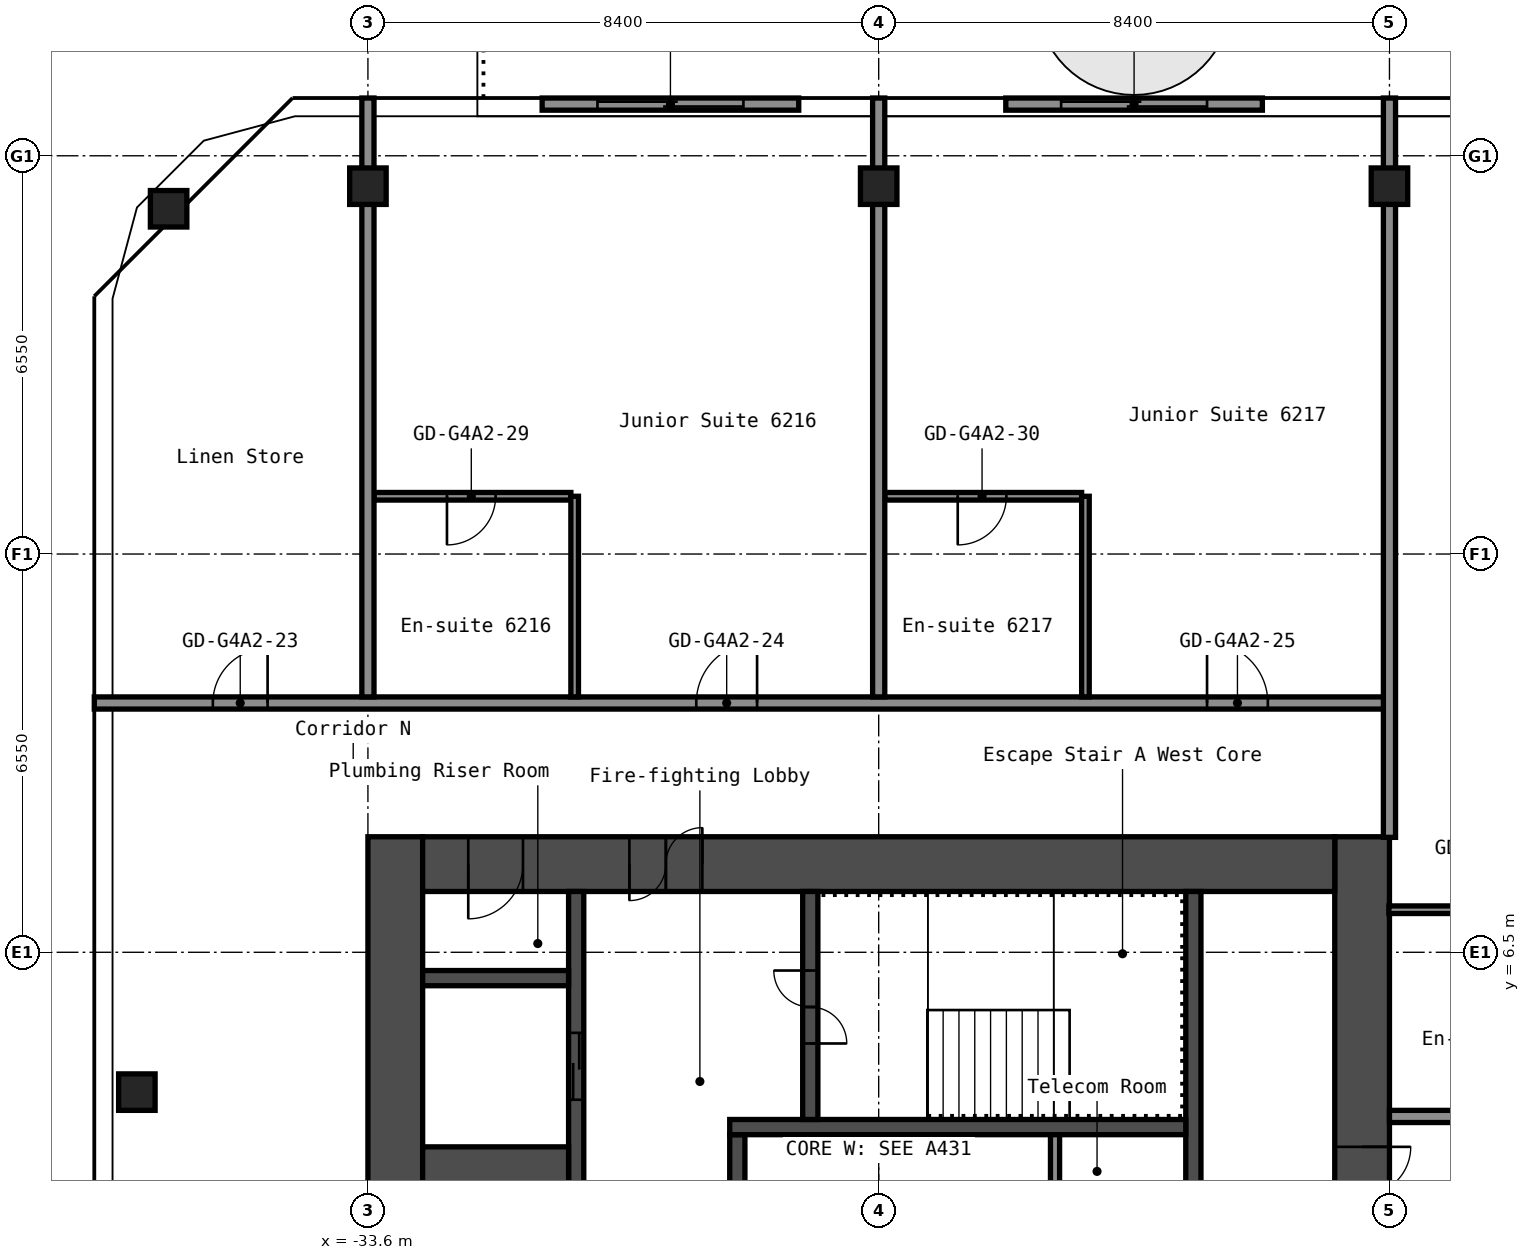
"""IFC4 building model, lengths in metres.
Left out: names, types, materials, properties, quantities, classifications, styles, units other than length and angle.
Written with IfcOpenShell. Run it as: python <this file> out.ifc"""

import sys

from ifc_helpers import new_model, si_unit, direction, frame, frame_2d, origin, origin_2d, place, context, subcontext, project, spatial, rectangle, hollow_rectangle, extrude, element, fill, save


model = new_model("IFC4")
c1 = context("Model", 3, precision=1e-05, world=origin(), true_north=direction((0.0, 1.0)))
c2 = subcontext(c1, "Body", "Model", "MODEL_VIEW")
j1 = project(units=[si_unit("LENGTHUNIT", "METRE"), si_unit("PLANEANGLEUNIT", "RADIAN")], contexts=[c1])
p1 = place(None, origin())
s1 = spatial("IfcSite", under=j1, at=p1, CompositionType="ELEMENT")
p2 = place(p1, origin())
s2 = spatial("IfcBuilding", under=s1, at=p2, CompositionType="ELEMENT")
p3 = place(p2, frame((0.0, 0.0, 218.6)))
s3 = spatial("IfcBuildingStorey", under=s2, at=p3, CompositionType="ELEMENT", Elevation=218.6)
for number, where, z_axis, x_axis in (
    (1, (-37.4, 4.2, 0.0), (0.0, 0.0, 1.0), (1.0, 0.0, 0.0)),
    (2, (-36.878, 18.729, 0.0), (0.0, 0.0, 1.0), (1.0, 0.0, 0.0)),
    (3, (-33.6, 19.1, 0.0), (0.0, 0.0, 1.0), (1.0, 0.0, 0.0)),
    (4, (-25.2, 19.1, 0.0), (0.0, 0.0, 1.0), (1.0, 0.0, 0.0)),
    (5, (-16.8, 19.1, 0.0), (0.0, 0.0, 1.0), (1.0, 0.0, 0.0)),
):
    element("IfcColumn", number, at=place(p3, frame(where, z_axis=z_axis, x_axis=x_axis)), inside=s3, PredefinedType="COLUMN", context=c2, shape_type="SweptSolid", body=[
        extrude(hollow_rectangle(XDim=0.6, YDim=0.6, WallThickness=0.025, InnerFilletRadius=0.038, OuterFilletRadius=0.062, at=origin_2d()), origin(), (0.0, 0.0, 1.0), 2.75),
    ])
p4 = place(p3, frame((-17.25, -8.4, 0.0), z_axis=(0.0, 0.0, 1.0), x_axis=(0.0, 1.0, 0.0)))
e6 = element("IfcWall", 6, at=p4, inside=s3, PredefinedType="SHEAR", context=c2, shape_type="SweptSolid", body=[
    extrude(rectangle(XDim=16.8, YDim=0.9, at=frame_2d((8.4, 0.0))), origin(), (0.0, 0.0, 1.0), 2.75),
])
p5 = place(p4, frame((10.1, 0.0, 0.0)))
e7 = element("IfcOpeningElement", 7, at=p5, cuts=e6, PredefinedType="OPENING", context=c2, shape_type="SweptSolid", body=[
    extrude(rectangle(XDim=1.6, YDim=2.1, at=frame_2d((0.8, 1.05))), frame((0.0, 0.46, 0.0), z_axis=(0.0, -1.0, 0.0), x_axis=(1.0, 0.0, 0.0)), (0.0, 0.0, 1.0), 0.92),
])
p6 = place(p3, frame((-33.15, -8.4, 0.0), z_axis=(0.0, 0.0, 1.0), x_axis=(0.0, 1.0, 0.0)))
e8 = element("IfcWall", 8, at=p6, inside=s3, PredefinedType="SHEAR", context=c2, shape_type="SweptSolid", body=[
    extrude(rectangle(XDim=16.8, YDim=0.9, at=frame_2d((8.4, 0.0))), origin(), (0.0, 0.0, 1.0), 2.75),
])
p7 = place(p3, frame((-32.7, 7.95, 0.0), z_axis=(0.0, 0.0, 1.0), x_axis=(1.0, 0.0, 0.0)))
e9 = element("IfcWall", 9, at=p7, inside=s3, PredefinedType="SHEAR", context=c2, shape_type="SweptSolid", body=[
    extrude(rectangle(XDim=15.0, YDim=0.9, at=frame_2d((7.5, 0.0))), origin(), (0.0, 0.0, 1.0), 2.75),
])
p8 = place(p7, frame((3.4, 0.0, 0.0)))
e10 = element("IfcOpeningElement", 10, at=p8, cuts=e9, PredefinedType="OPENING", context=c2, shape_type="SweptSolid", body=[
    extrude(rectangle(XDim=1.2, YDim=2.1, at=frame_2d((0.6, 1.05))), frame((0.0, 0.46, 0.0), z_axis=(0.0, -1.0, 0.0), x_axis=(1.0, 0.0, 0.0)), (0.0, 0.0, 1.0), 0.92),
])
p9 = place(p7, frame((0.75, 0.0, 0.0)))
e11 = element("IfcOpeningElement", 11, at=p9, cuts=e9, PredefinedType="OPENING", context=c2, shape_type="SweptSolid", body=[
    extrude(rectangle(XDim=0.9, YDim=2.1, at=frame_2d((0.45, 1.05))), frame((0.0, 0.46, 0.0), z_axis=(0.0, -1.0, 0.0), x_axis=(1.0, 0.0, 0.0)), (0.0, 0.0, 1.0), 0.92),
])
p10 = place(p3, frame((-20.025, 1.2, 0.0), z_axis=(0.0, 0.0, 1.0), x_axis=(0.0, 1.0, 0.0)))
e12 = element("IfcWall", 12, at=p10, inside=s3, PredefinedType="SHEAR", context=c2, shape_type="SweptSolid", body=[
    extrude(rectangle(XDim=6.3, YDim=0.25, at=frame_2d((3.15, 0.0))), origin(), (0.0, 0.0, 1.0), 2.75),
])
p11 = place(p3, frame((-27.525, 1.45, 0.0), z_axis=(0.0, 0.0, 1.0), x_axis=(0.0, 1.0, 0.0)))
e13 = element("IfcWall", 13, at=p11, inside=s3, PredefinedType="SHEAR", context=c2, shape_type="SweptSolid", body=[
    extrude(rectangle(XDim=2.05, YDim=0.25, at=frame_2d((1.025, 0.0))), origin(), (0.0, 0.0, 1.0), 2.75),
])
p12 = place(p3, frame((-27.65, 3.625, 0.0), z_axis=(0.0, 0.0, 1.0), x_axis=(1.0, 0.0, 0.0)))
e14 = element("IfcWall", 14, at=p12, inside=s3, PredefinedType="SHEAR", context=c2, shape_type="SweptSolid", body=[
    extrude(rectangle(XDim=7.5, YDim=0.25, at=frame_2d((3.75, 0.0))), origin(), (0.0, 0.0, 1.0), 2.75),
])
p13 = place(p3, frame((-26.325, 3.75, 0.0), z_axis=(0.0, 0.0, 1.0), x_axis=(0.0, 1.0, 0.0)))
e15 = element("IfcWall", 15, at=p13, inside=s3, PredefinedType="SHEAR", context=c2, shape_type="SweptSolid", body=[
    extrude(rectangle(XDim=3.75, YDim=0.25, at=frame_2d((1.875, 0.0))), origin(), (0.0, 0.0, 1.0), 2.75),
])
p14 = place(p13, frame((1.25, 0.0, 0.0)))
e16 = element("IfcOpeningElement", 16, at=p14, cuts=e15, PredefinedType="OPENING", context=c2, shape_type="SweptSolid", body=[
    extrude(rectangle(XDim=1.2, YDim=2.1, at=frame_2d((0.6, 1.05))), frame((0.0, 0.135, 0.0), z_axis=(0.0, -1.0, 0.0), x_axis=(1.0, 0.0, 0.0)), (0.0, 0.0, 1.0), 0.27),
])
p15 = place(p3, frame((-30.175, 1.45, 0.0), z_axis=(0.0, 0.0, 1.0), x_axis=(0.0, 1.0, 0.0)))
e17 = element("IfcWall", 17, at=p15, inside=s3, PredefinedType="SHEAR", context=c2, shape_type="SweptSolid", body=[
    extrude(rectangle(XDim=6.05, YDim=0.25, at=frame_2d((3.025, 0.0))), origin(), (0.0, 0.0, 1.0), 2.75),
])
p16 = place(p15, frame((2.625, 0.0, 0.0)))
e18 = element("IfcOpeningElement", 18, at=p16, cuts=e17, PredefinedType="OPENING", context=c2, shape_type="SweptSolid", body=[
    extrude(rectangle(XDim=1.1, YDim=2.1, at=frame_2d((0.55, 1.05))), frame((0.0, 0.135, 0.0), z_axis=(0.0, -1.0, 0.0), x_axis=(1.0, 0.0, 0.0)), (0.0, 0.0, 1.0), 0.27),
])
p17 = place(p3, frame((-32.7, 2.375, 0.0), z_axis=(0.0, 0.0, 1.0), x_axis=(1.0, 0.0, 0.0)))
e19 = element("IfcWall", 19, at=p17, inside=s3, PredefinedType="SHEAR", context=c2, shape_type="SweptSolid", body=[
    extrude(rectangle(XDim=2.4, YDim=1.85, at=frame_2d((1.2, 0.0))), origin(), (0.0, 0.0, 1.0), 2.75),
])
p18 = place(p3, frame((-32.7, 6.075, 0.0), z_axis=(0.0, 0.0, 1.0), x_axis=(1.0, 0.0, 0.0)))
e20 = element("IfcWall", 20, at=p18, inside=s3, PredefinedType="SHEAR", context=c2, shape_type="SweptSolid", body=[
    extrude(rectangle(XDim=2.4, YDim=0.25, at=frame_2d((1.2, 0.0))), origin(), (0.0, 0.0, 1.0), 2.75),
])
p19 = place(p3, frame((-22.3, 1.45, 0.0), z_axis=(0.0, 0.0, 1.0), x_axis=(0.0, 1.0, 0.0)))
e21 = element("IfcWall", 21, at=p19, inside=s3, PredefinedType="PARTITIONING", context=c2, shape_type="SweptSolid", body=[
    extrude(rectangle(XDim=2.05, YDim=0.15, at=frame_2d((1.025, 0.0))), origin(), (0.0, 0.0, 1.0), 2.75),
])
p20 = place(p3, frame((-16.8, 3.8, 0.0), z_axis=(0.0, 0.0, 1.0), x_axis=(1.0, 0.0, 0.0)))
e22 = element("IfcWall", 22, at=p20, inside=s3, PredefinedType="PARTITIONING", context=c2, shape_type="SweptSolid", body=[
    extrude(rectangle(XDim=33.6, YDim=0.2, at=frame_2d((16.8, 0.0))), origin(), (0.0, 0.0, 1.0), 2.75),
])
p21 = place(p20, frame((5.4, 0.0, 0.0)))
e23 = element("IfcOpeningElement", 23, at=p21, cuts=e22, PredefinedType="OPENING", context=c2, shape_type="SweptSolid", body=[
    extrude(rectangle(XDim=1.0, YDim=2.1, at=frame_2d((0.5, 1.05))), frame((0.0, 0.11, 0.0), z_axis=(0.0, -1.0, 0.0), x_axis=(1.0, 0.0, 0.0)), (0.0, 0.0, 1.0), 0.22),
])
p22 = place(p20, frame((12.1, 0.0, 0.0)))
e24 = element("IfcOpeningElement", 24, at=p22, cuts=e22, PredefinedType="OPENING", context=c2, shape_type="SweptSolid", body=[
    extrude(rectangle(XDim=1.0, YDim=2.1, at=frame_2d((0.5, 1.05))), frame((0.0, 0.11, 0.0), z_axis=(0.0, -1.0, 0.0), x_axis=(1.0, 0.0, 0.0)), (0.0, 0.0, 1.0), 0.22),
])
p23 = place(p20, frame((18.87, 0.0, 0.0)))
e25 = element("IfcOpeningElement", 25, at=p23, cuts=e22, PredefinedType="OPENING", context=c2, shape_type="SweptSolid", body=[
    extrude(rectangle(XDim=0.9, YDim=2.1, at=frame_2d((0.45, 1.05))), frame((0.0, 0.11, 0.0), z_axis=(0.0, -1.0, 0.0), x_axis=(1.0, 0.0, 0.0)), (0.0, 0.0, 1.0), 0.22),
])
p24 = place(p20, frame((23.07, 0.0, 0.0)))
e26 = element("IfcOpeningElement", 26, at=p24, cuts=e22, PredefinedType="OPENING", context=c2, shape_type="SweptSolid", body=[
    extrude(rectangle(XDim=0.9, YDim=2.1, at=frame_2d((0.45, 1.05))), frame((0.0, 0.11, 0.0), z_axis=(0.0, -1.0, 0.0), x_axis=(1.0, 0.0, 0.0)), (0.0, 0.0, 1.0), 0.22),
])
p25 = place(p20, frame((30.6, 0.0, 0.0)))
e27 = element("IfcOpeningElement", 27, at=p25, cuts=e22, PredefinedType="OPENING", context=c2, shape_type="SweptSolid", body=[
    extrude(rectangle(XDim=1.0, YDim=2.1, at=frame_2d((0.5, 1.05))), frame((0.0, 0.11, 0.0), z_axis=(0.0, -1.0, 0.0), x_axis=(1.0, 0.0, 0.0)), (0.0, 0.0, 1.0), 0.22),
])
p26 = place(p3, frame((-16.81, 7.2, 0.0), z_axis=(0.0, 0.0, 1.0), x_axis=(1.0, 0.0, 0.0)))
e28 = element("IfcWall", 28, at=p26, inside=s3, PredefinedType="PARTITIONING", context=c2, shape_type="SweptSolid", body=[
    extrude(rectangle(XDim=3.348, YDim=0.125, at=frame_2d((1.674, 0.0))), origin(), (0.0, 0.0, 1.0), 2.75),
])
p27 = place(p26, frame((1.31, 0.0, 0.0)))
e29 = element("IfcOpeningElement", 29, at=p27, cuts=e28, PredefinedType="OPENING", context=c2, shape_type="SweptSolid", body=[
    extrude(rectangle(XDim=0.8, YDim=2.1, at=frame_2d((0.4, 1.05))), frame((0.0, 0.073, 0.0), z_axis=(0.0, -1.0, 0.0), x_axis=(1.0, 0.0, 0.0)), (0.0, 0.0, 1.0), 0.145),
])
p28 = place(p3, frame((-38.1, 10.6, 0.0), z_axis=(0.0, 0.0, 1.0), x_axis=(1.0, 0.0, 0.0)))
e30 = element("IfcWall", 30, at=p28, inside=s3, PredefinedType="PARTITIONING", context=c2, shape_type="SweptSolid", body=[
    extrude(rectangle(XDim=21.3, YDim=0.2, at=frame_2d((10.65, 0.0))), origin(), (0.0, 0.0, 1.0), 2.75),
])
p29 = place(p28, frame((1.95, 0.0, 0.0)))
e31 = element("IfcOpeningElement", 31, at=p29, cuts=e30, PredefinedType="OPENING", context=c2, shape_type="SweptSolid", body=[
    extrude(rectangle(XDim=0.9, YDim=2.1, at=frame_2d((0.45, 1.05))), frame((0.0, 0.11, 0.0), z_axis=(0.0, -1.0, 0.0), x_axis=(1.0, 0.0, 0.0)), (0.0, 0.0, 1.0), 0.22),
])
p30 = place(p28, frame((9.9, 0.0, 0.0)))
e32 = element("IfcOpeningElement", 32, at=p30, cuts=e30, PredefinedType="OPENING", context=c2, shape_type="SweptSolid", body=[
    extrude(rectangle(XDim=1.0, YDim=2.1, at=frame_2d((0.5, 1.05))), frame((0.0, 0.11, 0.0), z_axis=(0.0, -1.0, 0.0), x_axis=(1.0, 0.0, 0.0)), (0.0, 0.0, 1.0), 0.22),
])
p31 = place(p28, frame((18.3, 0.0, 0.0)))
e33 = element("IfcOpeningElement", 33, at=p31, cuts=e30, PredefinedType="OPENING", context=c2, shape_type="SweptSolid", body=[
    extrude(rectangle(XDim=1.0, YDim=2.1, at=frame_2d((0.5, 1.05))), frame((0.0, 0.11, 0.0), z_axis=(0.0, -1.0, 0.0), x_axis=(1.0, 0.0, 0.0)), (0.0, 0.0, 1.0), 0.22),
])
p32 = place(p3, frame((-33.5, 14.0, 0.0), z_axis=(0.0, 0.0, 1.0), x_axis=(1.0, 0.0, 0.0)))
e34 = element("IfcWall", 34, at=p32, inside=s3, PredefinedType="PARTITIONING", context=c2, shape_type="SweptSolid", body=[
    extrude(rectangle(XDim=3.238, YDim=0.125, at=frame_2d((1.619, 0.0))), origin(), (0.0, 0.0, 1.0), 2.75),
])
p33 = place(p32, frame((1.2, 0.0, 0.0)))
e35 = element("IfcOpeningElement", 35, at=p33, cuts=e34, PredefinedType="OPENING", context=c2, shape_type="SweptSolid", body=[
    extrude(rectangle(XDim=0.8, YDim=2.1, at=frame_2d((0.4, 1.05))), frame((0.0, 0.073, 0.0), z_axis=(0.0, -1.0, 0.0), x_axis=(1.0, 0.0, 0.0)), (0.0, 0.0, 1.0), 0.145),
])
p34 = place(p3, frame((-25.1, 14.0, 0.0), z_axis=(0.0, 0.0, 1.0), x_axis=(1.0, 0.0, 0.0)))
e36 = element("IfcWall", 36, at=p34, inside=s3, PredefinedType="PARTITIONING", context=c2, shape_type="SweptSolid", body=[
    extrude(rectangle(XDim=3.238, YDim=0.125, at=frame_2d((1.619, 0.0))), origin(), (0.0, 0.0, 1.0), 2.75),
])
p35 = place(p34, frame((1.2, 0.0, 0.0)))
e37 = element("IfcOpeningElement", 37, at=p35, cuts=e36, PredefinedType="OPENING", context=c2, shape_type="SweptSolid", body=[
    extrude(rectangle(XDim=0.8, YDim=2.1, at=frame_2d((0.4, 1.05))), frame((0.0, 0.073, 0.0), z_axis=(0.0, -1.0, 0.0), x_axis=(1.0, 0.0, 0.0)), (0.0, 0.0, 1.0), 0.145),
])
p36 = place(p3, frame((-33.6, 10.7, 0.0), z_axis=(0.0, 0.0, 1.0), x_axis=(0.0, 1.0, 0.0)))
e38 = element("IfcWall", 38, at=p36, inside=s3, PredefinedType="PARTITIONING", context=c2, shape_type="SweptSolid", body=[
    extrude(rectangle(XDim=9.85, YDim=0.2, at=frame_2d((4.925, 0.0))), origin(), (0.0, 0.0, 1.0), 2.75),
])
p37 = place(p3, frame((-30.2, 10.7, 0.0), z_axis=(0.0, 0.0, 1.0), x_axis=(0.0, 1.0, 0.0)))
e39 = element("IfcWall", 39, at=p37, inside=s3, PredefinedType="PARTITIONING", context=c2, shape_type="SweptSolid", body=[
    extrude(rectangle(XDim=3.3, YDim=0.125, at=frame_2d((1.65, 0.0))), origin(), (0.0, 0.0, 1.0), 2.75),
])
p38 = place(p3, frame((-25.2, 10.7, 0.0), z_axis=(0.0, 0.0, 1.0), x_axis=(0.0, 1.0, 0.0)))
e40 = element("IfcWall", 40, at=p38, inside=s3, PredefinedType="PARTITIONING", context=c2, shape_type="SweptSolid", body=[
    extrude(rectangle(XDim=9.85, YDim=0.2, at=frame_2d((4.925, 0.0))), origin(), (0.0, 0.0, 1.0), 2.75),
])
p39 = place(p3, frame((-21.8, 10.7, 0.0), z_axis=(0.0, 0.0, 1.0), x_axis=(0.0, 1.0, 0.0)))
e41 = element("IfcWall", 41, at=p39, inside=s3, PredefinedType="PARTITIONING", context=c2, shape_type="SweptSolid", body=[
    extrude(rectangle(XDim=3.3, YDim=0.125, at=frame_2d((1.65, 0.0))), origin(), (0.0, 0.0, 1.0), 2.75),
])
p40 = place(p3, frame((-16.8, 8.39, 0.0), z_axis=(0.0, 0.0, 1.0), x_axis=(0.0, 1.0, 0.0)))
e42 = element("IfcWall", 42, at=p40, inside=s3, PredefinedType="PARTITIONING", context=c2, shape_type="SweptSolid", body=[
    extrude(rectangle(XDim=12.16, YDim=0.2, at=frame_2d((6.08, 0.0))), origin(), (0.0, 0.0, 1.0), 2.75),
])
p41 = place(p3, frame((-18.89, 20.45, 0.0), z_axis=(0.0, 0.0, 1.0), x_axis=(-1.0, 0.0, 0.0)))
p42 = place(p41, frame((0.91, 0.0, 0.0)))
p43 = place(p42, frame((2.4, 0.0, 0.0), z_axis=(0.0, 0.0, 1.0), x_axis=(-1.0, 0.0, 0.0)))
e43 = element("IfcDoor", 43, at=p43, inside=s3, OperationType="SLIDING_TO_LEFT", PredefinedType="DOOR", context=c2, shape_type="SweptSolid", body=[
    extrude(rectangle(XDim=2.4, YDim=2.2, at=frame_2d((1.2, 1.1))), frame((0.0, 0.025, 0.0), z_axis=(0.0, -1.0, 0.0), x_axis=(1.0, 0.0, 0.0)), (0.0, 0.0, 1.0), 0.05),
])
p44 = place(p3, frame((-26.515, 20.45, 0.0), z_axis=(0.0, 0.0, 1.0), x_axis=(-1.0, 0.0, 0.0)))
p45 = place(p44, frame((0.91, 0.0, 0.0)))
p46 = place(p45, frame((2.4, 0.0, 0.0), z_axis=(0.0, 0.0, 1.0), x_axis=(-1.0, 0.0, 0.0)))
e44 = element("IfcDoor", 44, at=p46, inside=s3, OperationType="SLIDING_TO_LEFT", PredefinedType="DOOR", context=c2, shape_type="SweptSolid", body=[
    extrude(rectangle(XDim=2.4, YDim=2.2, at=frame_2d((1.2, 1.1))), frame((0.0, 0.025, 0.0), z_axis=(0.0, -1.0, 0.0), x_axis=(1.0, 0.0, 0.0)), (0.0, 0.0, 1.0), 0.05),
])
p47 = place(p5, origin())
e45 = element("IfcDoor", 45, at=p47, inside=s3, OperationType="DOUBLE_DOOR_SINGLE_SWING", PredefinedType="DOOR", context=c2, shape_type="SweptSolid", body=[
    extrude(rectangle(XDim=1.6, YDim=2.1, at=frame_2d((0.8, 1.05))), frame((0.0, 0.025, 0.0), z_axis=(0.0, -1.0, 0.0), x_axis=(1.0, 0.0, 0.0)), (0.0, 0.0, 1.0), 0.05),
])
fill(e7, e45)
p48 = place(p8, origin())
e46 = element("IfcDoor", 46, at=p48, inside=s3, OperationType="DOUBLE_DOOR_SINGLE_SWING", PredefinedType="DOOR", context=c2, shape_type="SweptSolid", body=[
    extrude(rectangle(XDim=1.2, YDim=2.1, at=frame_2d((0.6, 1.05))), frame((0.0, 0.025, 0.0), z_axis=(0.0, -1.0, 0.0), x_axis=(1.0, 0.0, 0.0)), (0.0, 0.0, 1.0), 0.05),
])
fill(e10, e46)
p49 = place(p9, origin())
e47 = element("IfcDoor", 47, at=p49, inside=s3, OperationType="SINGLE_SWING_LEFT", PredefinedType="DOOR", context=c2, shape_type="SweptSolid", body=[
    extrude(rectangle(XDim=0.9, YDim=2.1, at=frame_2d((0.45, 1.05))), frame((0.0, 0.025, 0.0), z_axis=(0.0, -1.0, 0.0), x_axis=(1.0, 0.0, 0.0)), (0.0, 0.0, 1.0), 0.05),
])
fill(e11, e47)
p50 = place(p14, origin())
e48 = element("IfcDoor", 48, at=p50, inside=s3, OperationType="DOUBLE_DOOR_SINGLE_SWING", PredefinedType="DOOR", context=c2, shape_type="SweptSolid", body=[
    extrude(rectangle(XDim=1.2, YDim=2.1, at=frame_2d((0.6, 1.05))), frame((0.0, 0.025, 0.0), z_axis=(0.0, -1.0, 0.0), x_axis=(1.0, 0.0, 0.0)), (0.0, 0.0, 1.0), 0.05),
])
fill(e16, e48)
p51 = place(p16, origin())
e49 = element("IfcDoor", 49, at=p51, inside=s3, OperationType="DOUBLE_DOOR_SLIDING", PredefinedType="DOOR", context=c2, shape_type="SweptSolid", body=[
    extrude(rectangle(XDim=1.1, YDim=2.1, at=frame_2d((0.55, 1.05))), frame((0.0, 0.025, 0.0), z_axis=(0.0, -1.0, 0.0), x_axis=(1.0, 0.0, 0.0)), (0.0, 0.0, 1.0), 0.05),
])
fill(e18, e49)
p52 = place(p29, origin())
e50 = element("IfcDoor", 50, at=p52, inside=s3, OperationType="SINGLE_SWING_LEFT", PredefinedType="DOOR", context=c2, shape_type="SweptSolid", body=[
    extrude(rectangle(XDim=0.9, YDim=2.1, at=frame_2d((0.45, 1.05))), frame((0.0, 0.025, 0.0), z_axis=(0.0, -1.0, 0.0), x_axis=(1.0, 0.0, 0.0)), (0.0, 0.0, 1.0), 0.05),
])
fill(e31, e50)
p53 = place(p30, origin())
e51 = element("IfcDoor", 51, at=p53, inside=s3, OperationType="SINGLE_SWING_LEFT", PredefinedType="DOOR", context=c2, shape_type="SweptSolid", body=[
    extrude(rectangle(XDim=1.0, YDim=2.1, at=frame_2d((0.5, 1.05))), frame((0.0, 0.025, 0.0), z_axis=(0.0, -1.0, 0.0), x_axis=(1.0, 0.0, 0.0)), (0.0, 0.0, 1.0), 0.05),
])
fill(e32, e51)
p54 = place(p31, origin())
e52 = element("IfcDoor", 52, at=p54, inside=s3, OperationType="SINGLE_SWING_RIGHT", PredefinedType="DOOR", context=c2, shape_type="SweptSolid", body=[
    extrude(rectangle(XDim=1.0, YDim=2.1, at=frame_2d((0.5, 1.05))), frame((0.0, 0.025, 0.0), z_axis=(0.0, -1.0, 0.0), x_axis=(1.0, 0.0, 0.0)), (0.0, 0.0, 1.0), 0.05),
])
fill(e33, e52)
p55 = place(p33, origin())
e53 = element("IfcDoor", 53, at=p55, inside=s3, OperationType="SINGLE_SWING_LEFT", PredefinedType="DOOR", context=c2, shape_type="SweptSolid", body=[
    extrude(rectangle(XDim=0.8, YDim=2.1, at=frame_2d((0.4, 1.05))), frame((0.0, 0.025, 0.0), z_axis=(0.0, -1.0, 0.0), x_axis=(1.0, 0.0, 0.0)), (0.0, 0.0, 1.0), 0.05),
])
fill(e35, e53)
p56 = place(p35, origin())
e54 = element("IfcDoor", 54, at=p56, inside=s3, OperationType="SINGLE_SWING_LEFT", PredefinedType="DOOR", context=c2, shape_type="SweptSolid", body=[
    extrude(rectangle(XDim=0.8, YDim=2.1, at=frame_2d((0.4, 1.05))), frame((0.0, 0.025, 0.0), z_axis=(0.0, -1.0, 0.0), x_axis=(1.0, 0.0, 0.0)), (0.0, 0.0, 1.0), 0.05),
])
fill(e37, e54)
save(model, sys.argv[1])
